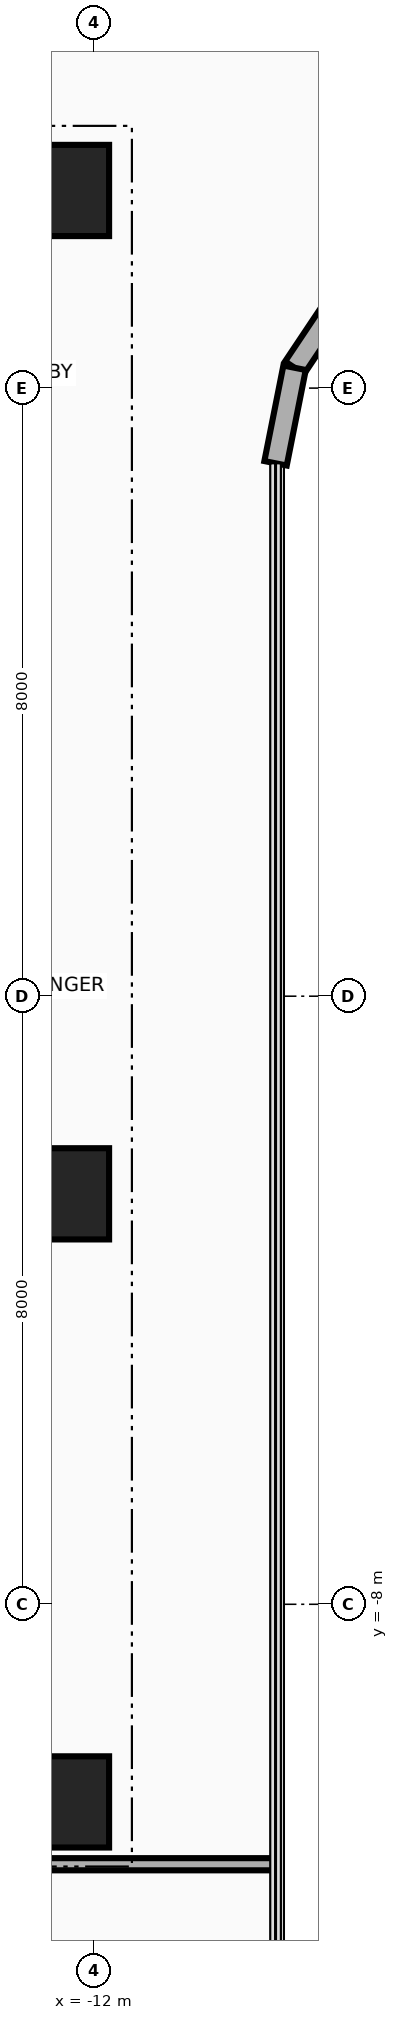
"""IFC4 building model, lengths in metres.
Left out: names, types, materials, properties, quantities, classifications, styles, units other than length and angle.
Written with IfcOpenShell. Run it as: python <this file> out.ifc"""

import sys

from ifc_helpers import new_model, si_unit, direction, frame, frame_2d, origin, origin_2d, place, context, subcontext, project, spatial, rectangle, extrude, source, transform, mapped, element, save


model = new_model("IFC4")
c1 = context("Model", 3, precision=1e-05, world=origin(), true_north=direction((0.0, 1.0)))
c2 = subcontext(c1, "Body", "Model", "MODEL_VIEW")
j1 = project(units=[si_unit("LENGTHUNIT", "METRE"), si_unit("PLANEANGLEUNIT", "RADIAN")], contexts=[c1])
p1 = place(None, origin())
s1 = spatial("IfcSite", under=j1, at=p1, CompositionType="ELEMENT")
p2 = place(p1, origin())
s2 = spatial("IfcBuilding", under=s1, at=p2, CompositionType="ELEMENT")
p3 = place(p2, frame((0.0, 0.0, 109.4)))
s3 = spatial("IfcBuildingStorey", under=s2, at=p3, CompositionType="ELEMENT", Elevation=109.4)
for number, where, z_axis, x_axis in (
    (1, (-22.65, 10.8, 0.0), (0.0, 0.0, 1.0), (1.0, 0.0, 0.0)),
    (2, (-22.65, -10.8, 0.0), (0.0, 0.0, 1.0), (1.0, 0.0, 0.0)),
):
    element("IfcWall", number, at=place(p3, frame(where, z_axis=z_axis, x_axis=x_axis)), inside=s3, PredefinedType="SHEAR", context=c2, shape_type="SweptSolid", body=[
        extrude(rectangle(XDim=10.25, YDim=0.7, at=frame_2d((5.125, 0.0))), origin(), (0.0, 0.0, 1.0), 3.46),
    ])
m1 = source(origin(), c2, "Body", "SweptSolid", [
    extrude(rectangle(XDim=1.2, YDim=1.2, at=origin_2d()), origin(), (0.0, 0.0, 1.0), 3.7),
])
for number, where, z_axis, x_axis in (
    (3, (-12.4, -10.6, 0.0), (0.0, 0.0, 1.0), (1.0, 0.0, 0.0)),
    (4, (-12.4, -2.6, 0.0), (0.0, 0.0, 1.0), (1.0, 0.0, 0.0)),
    (5, (-12.4, 10.6, 0.0), (0.0, 0.0, 1.0), (1.0, 0.0, 0.0)),
):
    element("IfcColumn", number, at=place(p3, frame(where, z_axis=z_axis, x_axis=x_axis)), inside=s3, PredefinedType="COLUMN", context=c2, shape_type="MappedRepresentation", body=[
        mapped(m1, transform((0.0, 0.0, 0.0), x_axis=(1.0, 0.0, 0.0), y_axis=(0.0, 1.0, 0.0), z_axis=(0.0, 0.0, 1.0), scale=1.0)),
    ])
p4 = place(p3, frame((-8.642, 9.342, 0.0), z_axis=(0.0, 0.0, 1.0), x_axis=(-0.555615398575, -0.831439431869, 0.0)))
e6 = element("IfcWall", 6, at=p4, inside=s3, PredefinedType="SOLIDWALL", context=c2, shape_type="SweptSolid", body=[
    extrude(rectangle(XDim=1.292, YDim=0.3, at=frame_2d((0.646, 0.0))), origin(), (0.0, 0.0, 1.0), 3.46),
])
p5 = place(p3, frame((-9.36, 8.268, 0.0), z_axis=(0.0, 0.0, 1.0), x_axis=(-0.195090163074, -0.980785312019, 0.0)))
e7 = element("IfcWall", 7, at=p5, inside=s3, PredefinedType="SOLIDWALL", context=c2, shape_type="SweptSolid", body=[
    extrude(rectangle(XDim=1.281, YDim=0.3, at=frame_2d((0.641, 0.0))), origin(), (0.0, 0.0, 1.0), 3.46),
])
p6 = place(p3, frame((-23.45, -11.42, 0.0), z_axis=(0.0, 0.0, 1.0), x_axis=(1.0, 0.0, 0.0)))
e8 = element("IfcWall", 8, at=p6, inside=s3, PredefinedType="PARTITIONING", context=c2, shape_type="SweptSolid", body=[
    extrude(rectangle(XDim=13.84, YDim=0.16, at=frame_2d((6.92, 0.0))), origin(), (0.0, 0.0, 1.0), 2.834),
])
save(model, sys.argv[1])
